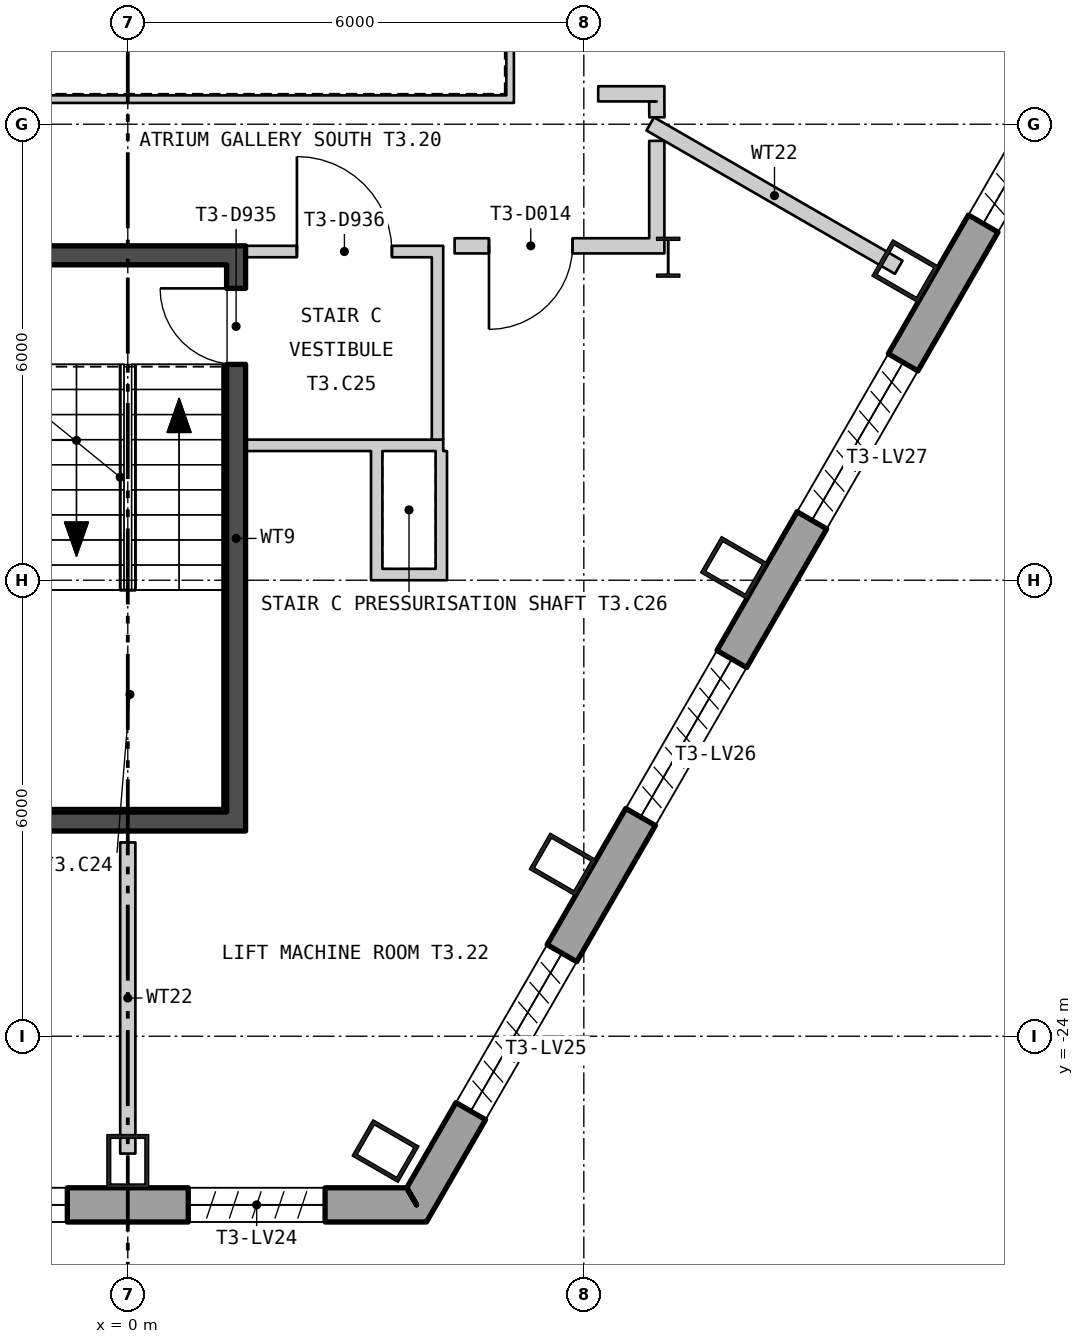
"""IFC4 building model, lengths in metres.
Left out: names, types, materials, properties, quantities, classifications, styles, units other than length and angle.
Written with IfcOpenShell. Run it as: python <this file> out.ifc"""

import sys

from ifc_helpers import new_model, si_unit, direction, frame, frame_2d, origin, origin_2d, place, context, subcontext, project, spatial, polyline, rectangle, hollow_rectangle, i_section, outline, extrude, element, fill, save


model = new_model("IFC4")
c1 = context("Model", 3, precision=1e-05, world=origin(), true_north=direction((0.0, 1.0)))
c2 = subcontext(c1, "Body", "Model", "MODEL_VIEW")
j1 = project(units=[si_unit("LENGTHUNIT", "METRE"), si_unit("PLANEANGLEUNIT", "RADIAN")], contexts=[c1])
p1 = place(None, origin())
s1 = spatial("IfcSite", under=j1, at=p1, CompositionType="ELEMENT")
p2 = place(p1, origin())
s2 = spatial("IfcBuilding", under=s1, at=p2, CompositionType="ELEMENT")
p3 = place(p2, frame((0.0, 0.0, 186.6)))
s3 = spatial("IfcBuildingStorey", under=s2, at=p3, CompositionType="ELEMENT", Elevation=186.6)
for number, where, z_axis, x_axis in (
    (1, (0.0, -25.644, 0.0), (0.0, 0.0, 1.0), (1.0, 0.0, 0.0)),
    (2, (3.391, -25.511, 0.0), (0.0, 0.0, 1.0), (0.5, 0.866, 0.0)),
    (3, (5.722, -21.74, 0.0), (0.0, 0.0, 1.0), (0.5, 0.866, 0.0)),
    (4, (7.976, -17.837, 0.0), (0.0, 0.0, 1.0), (0.5, 0.866, 0.0)),
    (5, (10.23, -13.933, 0.0), (0.0, 0.0, 1.0), (0.5, 0.866, 0.0)),
):
    element("IfcColumn", number, at=place(p3, frame(where, z_axis=z_axis, x_axis=x_axis)), inside=s3, PredefinedType="COLUMN", context=c2, shape_type="SweptSolid", body=[
        extrude(hollow_rectangle(XDim=0.55, YDim=0.7, WallThickness=0.05, at=origin_2d()), origin(), (0.0, 0.0, 1.0), 6.0),
    ])
p4 = place(p3, frame((7.11, -13.75, 0.0), z_axis=(0.0, 0.0, 1.0), x_axis=(1.0, 0.0, 0.0)))
e6 = element("IfcColumn", 6, at=p4, inside=s3, PredefinedType="COLUMN", context=c2, shape_type="SweptSolid", body=[
    extrude(i_section(OverallWidth=0.306, OverallDepth=0.524, WebThickness=0.021, FlangeThickness=0.04, at=origin_2d()), origin(), (0.0, 0.0, 1.0), 6.0),
])
p5 = place(p3, frame((-3.8, -26.219, -0.18), z_axis=(0.0, 0.0, 1.0), x_axis=(1.0, 0.0, 0.0)))
e7 = element("IfcWall", 7, at=p5, inside=s3, PredefinedType="SOLIDWALL", context=c2, shape_type="SweptSolid", body=[
    extrude(outline(polyline([(-0.13, -0.225), (7.73, -0.225), (7.47, 0.225), (0.13, 0.225), (-0.13, -0.225)])), origin(), (0.0, 0.0, 1.0), 6.0),
])
p6 = place(p5, frame((1.204, 0.0, 1.38)))
e8 = element("IfcOpeningElement", 8, at=p6, cuts=e7, PredefinedType="OPENING", context=c2, shape_type="SweptSolid", body=[
    extrude(rectangle(XDim=1.8, YDim=3.6, at=frame_2d((0.9, 1.8))), frame((0.0, 0.235, 0.0), z_axis=(0.0, -1.0, 0.0), x_axis=(1.0, 0.0, 0.0)), (0.0, 0.0, 1.0), 0.47),
])
p7 = place(p5, frame((4.596, 0.0, 1.38)))
e9 = element("IfcOpeningElement", 9, at=p7, cuts=e7, PredefinedType="OPENING", context=c2, shape_type="SweptSolid", body=[
    extrude(rectangle(XDim=1.8, YDim=3.6, at=frame_2d((0.9, 1.8))), frame((0.0, 0.235, 0.0), z_axis=(0.0, -1.0, 0.0), x_axis=(1.0, 0.0, 0.0)), (0.0, 0.0, 1.0), 0.47),
])
p8 = place(p3, frame((3.8, -26.219, -0.18), z_axis=(0.0, 0.0, 1.0), x_axis=(0.500000711659, 0.866024992908, 0.0)))
e10 = element("IfcWall", 10, at=p8, inside=s3, PredefinedType="SOLIDWALL", context=c2, shape_type="SweptSolid", body=[
    extrude(outline(polyline([(-0.13, -0.225), (45.87, -0.225), (45.61, 0.225), (0.13, 0.225), (-0.13, -0.225)])), origin(), (0.0, 0.0, 1.0), 6.0),
])
p9 = place(p8, frame((1.424, 0.0, 1.38)))
e11 = element("IfcOpeningElement", 11, at=p9, cuts=e10, PredefinedType="OPENING", context=c2, shape_type="SweptSolid", body=[
    extrude(rectangle(XDim=2.4, YDim=3.6, at=frame_2d((1.2, 1.8))), frame((0.0, 0.235, 0.0), z_axis=(0.0, -1.0, 0.0), x_axis=(1.0, 0.0, 0.0)), (0.0, 0.0, 1.0), 0.47),
])
p10 = place(p8, frame((5.893, 0.0, 1.38)))
e12 = element("IfcOpeningElement", 12, at=p10, cuts=e10, PredefinedType="OPENING", context=c2, shape_type="SweptSolid", body=[
    extrude(rectangle(XDim=2.4, YDim=3.6, at=frame_2d((1.2, 1.8))), frame((0.0, 0.235, 0.0), z_axis=(0.0, -1.0, 0.0), x_axis=(1.0, 0.0, 0.0)), (0.0, 0.0, 1.0), 0.47),
])
p11 = place(p8, frame((10.401, 0.0, 1.38)))
e13 = element("IfcOpeningElement", 13, at=p11, cuts=e10, PredefinedType="OPENING", context=c2, shape_type="SweptSolid", body=[
    extrude(rectangle(XDim=2.4, YDim=3.6, at=frame_2d((1.2, 1.8))), frame((0.0, 0.235, 0.0), z_axis=(0.0, -1.0, 0.0), x_axis=(1.0, 0.0, 0.0)), (0.0, 0.0, 1.0), 0.47),
])
p12 = place(p8, frame((14.909, 0.0, 1.38)))
e14 = element("IfcOpeningElement", 14, at=p12, cuts=e10, PredefinedType="OPENING", context=c2, shape_type="SweptSolid", body=[
    extrude(rectangle(XDim=2.4, YDim=3.6, at=frame_2d((1.2, 1.8))), frame((0.0, 0.235, 0.0), z_axis=(0.0, -1.0, 0.0), x_axis=(1.0, 0.0, 0.0)), (0.0, 0.0, 1.0), 0.47),
])
p13 = place(p8, frame((19.416, 0.0, 1.38)))
e15 = element("IfcOpeningElement", 15, at=p13, cuts=e10, PredefinedType="OPENING", context=c2, shape_type="SweptSolid", body=[
    extrude(rectangle(XDim=2.4, YDim=3.6, at=frame_2d((1.2, 1.8))), frame((0.0, 0.235, 0.0), z_axis=(0.0, -1.0, 0.0), x_axis=(1.0, 0.0, 0.0)), (0.0, 0.0, 1.0), 0.47),
])
p14 = place(p8, frame((23.924, 0.0, 1.38)))
e16 = element("IfcOpeningElement", 16, at=p14, cuts=e10, PredefinedType="OPENING", context=c2, shape_type="SweptSolid", body=[
    extrude(rectangle(XDim=2.4, YDim=3.6, at=frame_2d((1.2, 1.8))), frame((0.0, 0.235, 0.0), z_axis=(0.0, -1.0, 0.0), x_axis=(1.0, 0.0, 0.0)), (0.0, 0.0, 1.0), 0.47),
])
p15 = place(p8, frame((28.431, 0.0, 1.38)))
e17 = element("IfcOpeningElement", 17, at=p15, cuts=e10, PredefinedType="OPENING", context=c2, shape_type="SweptSolid", body=[
    extrude(rectangle(XDim=2.4, YDim=3.6, at=frame_2d((1.2, 1.8))), frame((0.0, 0.235, 0.0), z_axis=(0.0, -1.0, 0.0), x_axis=(1.0, 0.0, 0.0)), (0.0, 0.0, 1.0), 0.47),
])
p16 = place(p8, frame((32.939, 0.0, 1.38)))
e18 = element("IfcOpeningElement", 18, at=p16, cuts=e10, PredefinedType="OPENING", context=c2, shape_type="SweptSolid", body=[
    extrude(rectangle(XDim=2.4, YDim=3.6, at=frame_2d((1.2, 1.8))), frame((0.0, 0.235, 0.0), z_axis=(0.0, -1.0, 0.0), x_axis=(1.0, 0.0, 0.0)), (0.0, 0.0, 1.0), 0.47),
])
p17 = place(p8, frame((37.447, 0.0, 1.38)))
e19 = element("IfcOpeningElement", 19, at=p17, cuts=e10, PredefinedType="OPENING", context=c2, shape_type="SweptSolid", body=[
    extrude(rectangle(XDim=2.4, YDim=3.6, at=frame_2d((1.2, 1.8))), frame((0.0, 0.235, 0.0), z_axis=(0.0, -1.0, 0.0), x_axis=(1.0, 0.0, 0.0)), (0.0, 0.0, 1.0), 0.47),
])
p18 = place(p8, frame((41.916, 0.0, 1.38)))
e20 = element("IfcOpeningElement", 20, at=p18, cuts=e10, PredefinedType="OPENING", context=c2, shape_type="SweptSolid", body=[
    extrude(rectangle(XDim=2.4, YDim=3.6, at=frame_2d((1.2, 1.8))), frame((0.0, 0.235, 0.0), z_axis=(0.0, -1.0, 0.0), x_axis=(1.0, 0.0, 0.0)), (0.0, 0.0, 1.0), 0.47),
])
p19 = place(p3, frame((-5.08, -11.67, 0.0), z_axis=(0.0, 0.0, 1.0), x_axis=(1.0, 0.0, 0.0)))
e21 = element("IfcWall", 21, at=p19, inside=s3, PredefinedType="PARTITIONING", context=c2, shape_type="SweptSolid", body=[
    extrude(rectangle(XDim=10.16, YDim=0.1, at=frame_2d((5.08, 0.0))), origin(), (0.0, 0.0, 1.0), 5.8),
])
p20 = place(p3, frame((5.03, -11.62, 0.0), z_axis=(0.0, 0.0, 1.0), x_axis=(0.0, 1.0, 0.0)))
e22 = element("IfcWall", 22, at=p20, inside=s3, PredefinedType="PARTITIONING", context=c2, shape_type="SweptSolid", body=[
    extrude(rectangle(XDim=8.04, YDim=0.1, at=frame_2d((4.02, 0.0))), origin(), (0.0, 0.0, 1.0), 5.8),
])
p21 = place(p3, frame((1.425, -21.05, 0.0), z_axis=(0.0, 0.0, 1.0), x_axis=(0.0, 1.0, 0.0)))
e23 = element("IfcWall", 23, at=p21, inside=s3, PredefinedType="SHEAR", context=c2, shape_type="SweptSolid", body=[
    extrude(rectangle(XDim=7.2, YDim=0.25, at=frame_2d((3.6, 0.0))), origin(), (0.0, 0.0, 1.0), 5.8),
])
p22 = place(p21, frame((5.89, 0.0, 0.0)))
e24 = element("IfcOpeningElement", 24, at=p22, cuts=e23, PredefinedType="OPENING", context=c2, shape_type="SweptSolid", body=[
    extrude(rectangle(XDim=1.0, YDim=2.1, at=frame_2d((0.5, 1.05))), frame((0.0, 0.135, 0.0), z_axis=(0.0, -1.0, 0.0), x_axis=(1.0, 0.0, 0.0)), (0.0, 0.0, 1.0), 0.27),
])
for number, where, z_axis, x_axis in (
    (25, (-1.55, -21.175, 0.0), (0.0, 0.0, 1.0), (1.0, 0.0, 0.0)),
    (26, (-1.55, -13.725, 0.0), (0.0, 0.0, 1.0), (1.0, 0.0, 0.0)),
):
    element("IfcWall", number, at=place(p3, frame(where, z_axis=z_axis, x_axis=x_axis)), inside=s3, PredefinedType="SHEAR", context=c2, shape_type="SweptSolid", body=[
        extrude(rectangle(XDim=3.1, YDim=0.25, at=frame_2d((1.55, 0.0))), origin(), (0.0, 0.0, 1.0), 5.8),
    ])
p23 = place(p3, frame((1.55, -16.225, 0.0), z_axis=(0.0, 0.0, 1.0), x_axis=(1.0, 0.0, 0.0)))
e27 = element("IfcWall", 27, at=p23, inside=s3, PredefinedType="PARTITIONING", context=c2, shape_type="SweptSolid", body=[
    extrude(rectangle(XDim=2.6, YDim=0.15, at=frame_2d((1.3, 0.0))), origin(), (0.0, 0.0, 1.0), 5.8),
])
p24 = place(p3, frame((4.075, -16.15, 0.0), z_axis=(0.0, 0.0, 1.0), x_axis=(0.0, 1.0, 0.0)))
e28 = element("IfcWall", 28, at=p24, inside=s3, PredefinedType="PARTITIONING", context=c2, shape_type="SweptSolid", body=[
    extrude(rectangle(XDim=2.4, YDim=0.15, at=frame_2d((1.2, 0.0))), origin(), (0.0, 0.0, 1.0), 5.8),
])
p25 = place(p3, frame((1.55, -13.675, 0.0), z_axis=(0.0, 0.0, 1.0), x_axis=(1.0, 0.0, 0.0)))
e29 = element("IfcWall", 29, at=p25, inside=s3, PredefinedType="PARTITIONING", context=c2, shape_type="SweptSolid", body=[
    extrude(rectangle(XDim=2.6, YDim=0.15, at=frame_2d((1.3, 0.0))), origin(), (0.0, 0.0, 1.0), 5.01),
])
p26 = place(p25, frame((0.675, 0.0, 0.0)))
e30 = element("IfcOpeningElement", 30, at=p26, cuts=e29, PredefinedType="OPENING", context=c2, shape_type="SweptSolid", body=[
    extrude(rectangle(XDim=1.25, YDim=2.1, at=frame_2d((0.625, 1.05))), frame((0.0, 0.085, 0.0), z_axis=(0.0, -1.0, 0.0), x_axis=(1.0, 0.0, 0.0)), (0.0, 0.0, 1.0), 0.17),
])
p27 = place(p3, frame((3.275, -18.0, 0.0), z_axis=(0.0, 0.0, 1.0), x_axis=(0.0, 1.0, 0.0)))
e31 = element("IfcWall", 31, at=p27, inside=s3, PredefinedType="PARTITIONING", context=c2, shape_type="SweptSolid", body=[
    extrude(rectangle(XDim=1.7, YDim=0.15, at=frame_2d((0.85, 0.0))), origin(), (0.0, 0.0, 1.0), 5.11),
])
p28 = place(p3, frame((3.35, -17.925, 0.0), z_axis=(0.0, 0.0, 1.0), x_axis=(1.0, 0.0, 0.0)))
e32 = element("IfcWall", 32, at=p28, inside=s3, PredefinedType="PARTITIONING", context=c2, shape_type="SweptSolid", body=[
    extrude(rectangle(XDim=0.7, YDim=0.15, at=frame_2d((0.35, 0.0))), origin(), (0.0, 0.0, 1.0), 5.8),
])
p29 = place(p3, frame((4.125, -18.0, 0.0), z_axis=(0.0, 0.0, 1.0), x_axis=(0.0, 1.0, 0.0)))
e33 = element("IfcWall", 33, at=p29, inside=s3, PredefinedType="PARTITIONING", context=c2, shape_type="SweptSolid", body=[
    extrude(rectangle(XDim=1.7, YDim=0.15, at=frame_2d((0.85, 0.0))), origin(), (0.0, 0.0, 1.0), 5.8),
])
p30 = place(p3, frame((0.0, -25.544, 0.0), z_axis=(0.0, 0.0, 1.0), x_axis=(0.0, 1.0, 0.0)))
e34 = element("IfcWall", 34, at=p30, inside=s3, PredefinedType="PARTITIONING", context=c2, shape_type="SweptSolid", body=[
    extrude(rectangle(XDim=4.094, YDim=0.2, at=frame_2d((2.047, 0.0))), origin(), (0.0, 0.0, 1.0), 5.25),
])
p31 = place(p3, frame((4.3, -13.6, 0.0), z_axis=(0.0, 0.0, 1.0), x_axis=(1.0, 0.0, 0.0)))
e35 = element("IfcWall", 35, at=p31, inside=s3, PredefinedType="PARTITIONING", context=c2, shape_type="SweptSolid", body=[
    extrude(rectangle(XDim=2.76, YDim=0.2, at=frame_2d((1.38, 0.0))), origin(), (0.0, 0.0, 1.0), 5.01),
])
p32 = place(p31, frame((0.452, 0.0, 0.0)))
e36 = element("IfcOpeningElement", 36, at=p32, cuts=e35, PredefinedType="OPENING", context=c2, shape_type="SweptSolid", body=[
    extrude(rectangle(XDim=1.1, YDim=2.1, at=frame_2d((0.55, 1.05))), frame((0.0, 0.11, 0.0), z_axis=(0.0, -1.0, 0.0), x_axis=(1.0, 0.0, 0.0)), (0.0, 0.0, 1.0), 0.22),
])
p33 = place(p3, frame((6.189, -11.6, 0.0), z_axis=(0.0, 0.0, 1.0), x_axis=(1.0, 0.0, 0.0)))
e37 = element("IfcWall", 37, at=p33, inside=s3, PredefinedType="PARTITIONING", context=c2, shape_type="SweptSolid", body=[
    extrude(rectangle(XDim=0.871, YDim=0.2, at=frame_2d((0.435, 0.0))), origin(), (0.0, 0.0, 1.0), 5.8),
])
p34 = place(p3, frame((6.874, -11.996, 0.0), z_axis=(0.0, 0.0, 1.0), x_axis=(0.866181174779, -0.499730099612, 0.0)))
e38 = element("IfcWall", 38, at=p34, inside=s3, PredefinedType="PARTITIONING", context=c2, shape_type="SweptSolid", body=[
    extrude(rectangle(XDim=3.774, YDim=0.2, at=frame_2d((1.887, 0.0))), origin(), (0.0, 0.0, 1.0), 5.8),
])
p35 = place(p3, frame((6.96, -13.5, 0.0), z_axis=(0.0, 0.0, 1.0), x_axis=(0.0, 1.0, 0.0)))
e39 = element("IfcWall", 39, at=p35, inside=s3, PredefinedType="PARTITIONING", context=c2, shape_type="SweptSolid", body=[
    extrude(rectangle(XDim=1.281, YDim=0.2, at=frame_2d((0.64, 0.0))), origin(), (0.0, 0.0, 1.0), 5.21),
])
p36 = place(p3, frame((6.96, -11.7, 0.0), z_axis=(0.0, 0.0, 1.0), x_axis=(0.004784634228, -0.999988553572, 0.0)))
e40 = element("IfcWall", 40, at=p36, inside=s3, PredefinedType="PARTITIONING", context=c2, shape_type="SweptSolid", body=[
    extrude(rectangle(XDim=0.209, YDim=0.2, at=frame_2d((0.104, 0.0))), origin(), (0.0, 0.0, 1.0), 5.8),
])
p37 = place(p22, origin())
e41 = element("IfcDoor", 41, at=p37, inside=s3, OperationType="SINGLE_SWING_LEFT", PredefinedType="DOOR", context=c2, shape_type="SweptSolid", body=[
    extrude(rectangle(XDim=1.0, YDim=2.1, at=frame_2d((0.5, 1.05))), frame((0.0, 0.025, 0.0), z_axis=(0.0, -1.0, 0.0), x_axis=(1.0, 0.0, 0.0)), (0.0, 0.0, 1.0), 0.05),
])
fill(e24, e41)
p38 = place(p26, origin())
e42 = element("IfcDoor", 42, at=p38, inside=s3, OperationType="SINGLE_SWING_RIGHT", PredefinedType="DOOR", context=c2, shape_type="SweptSolid", body=[
    extrude(rectangle(XDim=1.25, YDim=2.1, at=frame_2d((0.625, 1.05))), frame((0.0, 0.025, 0.0), z_axis=(0.0, -1.0, 0.0), x_axis=(1.0, 0.0, 0.0)), (0.0, 0.0, 1.0), 0.05),
])
fill(e30, e42)
p39 = place(p32, origin())
e43 = element("IfcDoor", 43, at=p39, inside=s3, OperationType="SINGLE_SWING_LEFT", PredefinedType="DOOR", context=c2, shape_type="SweptSolid", body=[
    extrude(rectangle(XDim=1.1, YDim=2.1, at=frame_2d((0.55, 1.05))), frame((0.0, 0.025, 0.0), z_axis=(0.0, -1.0, 0.0), x_axis=(1.0, 0.0, 0.0)), (0.0, 0.0, 1.0), 0.05),
])
fill(e36, e43)
save(model, sys.argv[1])
